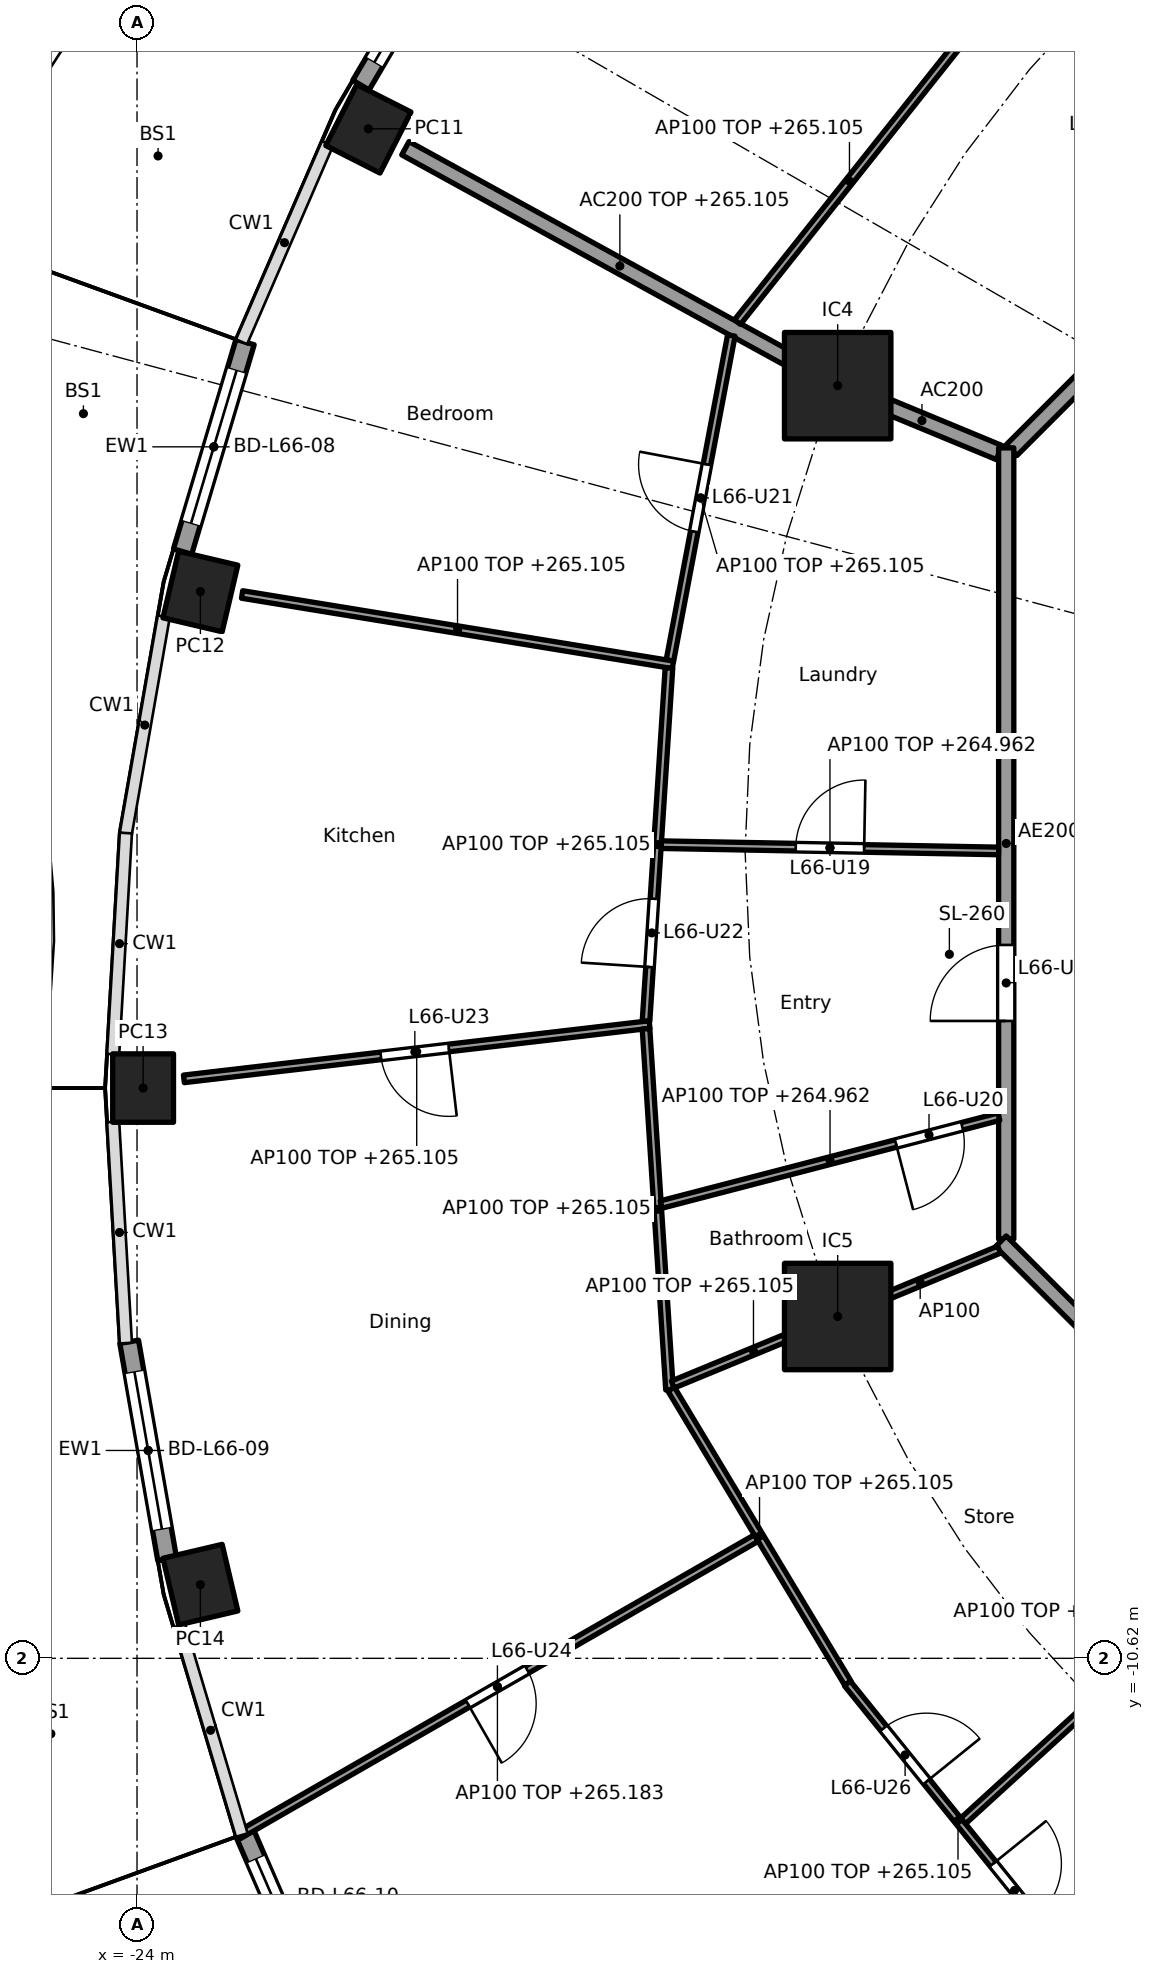
"""IFC4 building model, lengths in metres.
Left out: names, types, materials, properties, quantities, classifications, styles, units other than length and angle.
Written with IfcOpenShell. Run it as: python <this file> out.ifc"""

import sys

from ifc_helpers import new_model, si_unit, direction, frame, frame_2d, origin, origin_2d, place, context, subcontext, project, spatial, rectangle, hollow_rectangle, extrude, element, fill, save


model = new_model("IFC4")
c1 = context("Model", 3, precision=1e-05, world=origin(), true_north=direction((0.0, 1.0)))
c2 = subcontext(c1, "Body", "Model", "MODEL_VIEW")
j1 = project(units=[si_unit("LENGTHUNIT", "METRE"), si_unit("PLANEANGLEUNIT", "RADIAN")], contexts=[c1])
p1 = place(None, origin())
s1 = spatial("IfcSite", under=j1, at=p1, CompositionType="ELEMENT")
p2 = place(p1, origin())
s2 = spatial("IfcBuilding", under=s1, at=p2, CompositionType="ELEMENT")
p3 = place(p2, frame((0.0, 0.0, 262.2)))
s3 = spatial("IfcBuildingStorey", under=s2, at=p3, CompositionType="ELEMENT", Elevation=262.2)
for number, where, z_axis, x_axis in (
    (1, (-20.957, 9.502, 0.0), (0.0, 0.0, 1.0), (-0.452, -0.892, 0.0)),
    (2, (-23.166, 3.415, 0.0), (0.0, 0.0, 1.0), (-0.229, -0.973, 0.0)),
    (3, (-23.92, -3.118, 0.0), (0.0, 0.0, 1.0), (0.0, -1.0, 0.0)),
    (4, (-23.166, -9.65, 0.0), (0.0, 0.0, 1.0), (0.229, -0.973, 0.0)),
):
    element("IfcColumn", number, at=place(p3, frame(where, z_axis=z_axis, x_axis=x_axis)), inside=s3, PredefinedType="COLUMN", context=c2, shape_type="SweptSolid", body=[
        extrude(hollow_rectangle(XDim=0.9, YDim=0.8, WallThickness=0.028, at=origin_2d()), origin(), (0.0, 0.0, 1.0), 3.7),
    ])
for number, where, z_axis, x_axis in (
    (5, (-14.782, 6.123, 0.0), (0.0, 0.0, 1.0), (1.0, 0.0, 0.0)),
    (6, (-14.782, -6.123, 0.0), (0.0, 0.0, 1.0), (1.0, 0.0, 0.0)),
):
    element("IfcColumn", number, at=place(p3, frame(where, z_axis=z_axis, x_axis=x_axis)), inside=s3, PredefinedType="COLUMN", context=c2, shape_type="SweptSolid", body=[
        extrude(rectangle(XDim=1.4, YDim=1.4, at=origin_2d()), origin(), (0.0, 0.0, 1.0), 3.7),
    ])
p4 = place(p3, frame((-21.054, 10.077, 0.0), z_axis=(0.0, 0.0, 1.0), x_axis=(0.506371364425, 0.862315511452, 0.0)))
e7 = element("IfcWall", 7, at=p4, inside=s3, PredefinedType="SOLIDWALL", context=c2, shape_type="SweptSolid", body=[
    extrude(rectangle(XDim=2.796, YDim=0.25, at=frame_2d((1.398, 0.0))), origin(), (0.0, 0.0, 1.0), 3.44),
])
p5 = place(p4, frame((0.348, 0.0, 0.0)))
e8 = element("IfcOpeningElement", 8, at=p5, cuts=e7, PredefinedType="OPENING", context=c2, shape_type="SweptSolid", body=[
    extrude(rectangle(XDim=2.1, YDim=2.4, at=frame_2d((1.05, 1.2))), frame((0.0, 0.135, 0.0), z_axis=(0.0, -1.0, 0.0), x_axis=(1.0, 0.0, 0.0)), (0.0, 0.0, 1.0), 0.27),
])
p6 = place(p3, frame((-23.401, 3.94, 0.0), z_axis=(0.0, 0.0, 1.0), x_axis=(0.285876209024, 0.9582665564, 0.0)))
e9 = element("IfcWall", 9, at=p6, inside=s3, PredefinedType="SOLIDWALL", context=c2, shape_type="SweptSolid", body=[
    extrude(rectangle(XDim=2.877, YDim=0.25, at=frame_2d((1.438, 0.0))), origin(), (0.0, 0.0, 1.0), 3.44),
])
p7 = place(p6, frame((0.389, 0.0, 0.0)))
e10 = element("IfcOpeningElement", 10, at=p7, cuts=e9, PredefinedType="OPENING", context=c2, shape_type="SweptSolid", body=[
    extrude(rectangle(XDim=2.1, YDim=2.4, at=frame_2d((1.05, 1.2))), frame((0.0, 0.135, 0.0), z_axis=(0.0, -1.0, 0.0), x_axis=(1.0, 0.0, 0.0)), (0.0, 0.0, 1.0), 0.27),
])
p8 = place(p3, frame((-23.604, -9.315, 0.0), z_axis=(0.0, 0.0, 1.0), x_axis=(-0.172182411767, 0.985065082661, 0.0)))
e11 = element("IfcWall", 11, at=p8, inside=s3, PredefinedType="SOLIDWALL", context=c2, shape_type="SweptSolid", body=[
    extrude(rectangle(XDim=2.903, YDim=0.25, at=frame_2d((1.451, 0.0))), origin(), (0.0, 0.0, 1.0), 3.44),
])
p9 = place(p8, frame((0.401, 0.0, 0.0)))
e12 = element("IfcOpeningElement", 12, at=p9, cuts=e11, PredefinedType="OPENING", context=c2, shape_type="SweptSolid", body=[
    extrude(rectangle(XDim=2.1, YDim=2.4, at=frame_2d((1.05, 1.2))), frame((0.0, 0.135, 0.0), z_axis=(0.0, -1.0, 0.0), x_axis=(1.0, 0.0, 0.0)), (0.0, 0.0, 1.0), 0.27),
])
p10 = place(p3, frame((-21.454, -15.525, 0.0), z_axis=(0.0, 0.0, 1.0), x_axis=(-0.397597791596, 0.9175598052, 0.0)))
e13 = element("IfcWall", 13, at=p10, inside=s3, PredefinedType="SOLIDWALL", context=c2, shape_type="SweptSolid", body=[
    extrude(rectangle(XDim=2.841, YDim=0.25, at=frame_2d((1.42, 0.0))), origin(), (0.0, 0.0, 1.0), 3.44),
])
p11 = place(p10, frame((0.371, 0.0, 0.0)))
e14 = element("IfcOpeningElement", 14, at=p11, cuts=e13, PredefinedType="OPENING", context=c2, shape_type="SweptSolid", body=[
    extrude(rectangle(XDim=2.1, YDim=2.4, at=frame_2d((1.05, 1.2))), frame((0.0, 0.135, 0.0), z_axis=(0.0, -1.0, 0.0), x_axis=(1.0, 0.0, 0.0)), (0.0, 0.0, 1.0), 0.27),
])
p12 = place(p3, frame((-12.657, 5.243, 0.0), z_axis=(0.0, 0.0, 1.0), x_axis=(-0.923869415315, 0.382707856524, 0.0)))
e15 = element("IfcWall", 15, at=p12, inside=s3, PredefinedType="PARTITIONING", context=c2, shape_type="SweptSolid", body=[
    extrude(rectangle(XDim=2.2, YDim=0.2, at=frame_2d((1.1, 0.0))), origin(), (0.0, 0.0, 1.0), 3.44),
])
p13 = place(p3, frame((-14.826, 6.147, 0.0), z_axis=(0.0, 0.0, 1.0), x_axis=(-0.876484755865, 0.481429613481, 0.0)))
e16 = element("IfcWall", 16, at=p13, inside=s3, PredefinedType="PARTITIONING", context=c2, shape_type="SweptSolid", body=[
    extrude(rectangle(XDim=6.439, YDim=0.2, at=frame_2d((3.219, 0.0))), origin(), (0.0, 0.0, 1.0), 2.905),
])
p14 = place(p3, frame((-5.275, 12.494, 0.0), z_axis=(0.0, 0.0, 1.0), x_axis=(-0.707106781187, -0.707106781187, 0.0)))
e17 = element("IfcWall", 17, at=p14, inside=s3, PredefinedType="PARTITIONING", context=c2, shape_type="SweptSolid", body=[
    extrude(rectangle(XDim=10.209, YDim=0.2, at=frame_2d((5.104, 0.0))), origin(), (0.0, 0.0, 1.0), 3.44),
])
p15 = place(p3, frame((-12.565, 5.304, 0.0), z_axis=(0.0, 0.0, 1.0), x_axis=(0.0, -1.0, 0.0)))
e18 = element("IfcWall", 18, at=p15, inside=s3, PredefinedType="PARTITIONING", context=c2, shape_type="SweptSolid", body=[
    extrude(rectangle(XDim=10.409, YDim=0.2, at=frame_2d((5.205, 0.0))), origin(), (0.0, 0.0, 1.0), 3.44),
])
p16 = place(p15, frame((6.539, 0.0, 0.0)))
e19 = element("IfcOpeningElement", 19, at=p16, cuts=e18, PredefinedType="OPENING", context=c2, shape_type="SweptSolid", body=[
    extrude(rectangle(XDim=1.0, YDim=2.1, at=frame_2d((0.5, 1.05))), frame((0.0, 0.11, 0.0), z_axis=(0.0, -1.0, 0.0), x_axis=(1.0, 0.0, 0.0)), (0.0, 0.0, 1.0), 0.22),
])
p17 = place(p3, frame((-12.635, -5.134, 0.0), z_axis=(0.0, 0.0, 1.0), x_axis=(0.707106781187, -0.707106781187, 0.0)))
e20 = element("IfcWall", 20, at=p17, inside=s3, PredefinedType="PARTITIONING", context=c2, shape_type="SweptSolid", body=[
    extrude(rectangle(XDim=10.609, YDim=0.2, at=frame_2d((5.305, 0.0))), origin(), (0.0, 0.0, 1.0), 3.44),
])
p18 = place(p3, frame((-13.154, 10.667, 0.0), z_axis=(0.0, 0.0, 1.0), x_axis=(-0.622246555556, -0.782821323227, 0.0)))
e21 = element("IfcWall", 21, at=p18, inside=s3, PredefinedType="PARTITIONING", context=c2, shape_type="SweptSolid", body=[
    extrude(rectangle(XDim=4.736, YDim=0.1, at=frame_2d((2.368, 0.0))), origin(), (0.0, 0.0, 1.0), 2.905),
])
p19 = place(p3, frame((-16.181, 6.783, 0.0), z_axis=(0.0, 0.0, 1.0), x_axis=(-0.185670583745, -0.982612046706, 0.0)))
e22 = element("IfcWall", 22, at=p19, inside=s3, PredefinedType="PARTITIONING", context=c2, shape_type="SweptSolid", body=[
    extrude(rectangle(XDim=4.351, YDim=0.1, at=frame_2d((2.176, 0.0))), origin(), (0.0, 0.0, 1.0), 2.905),
])
p20 = place(p19, frame((1.726, 0.0, 0.0)))
e23 = element("IfcOpeningElement", 23, at=p20, cuts=e22, PredefinedType="OPENING", context=c2, shape_type="SweptSolid", body=[
    extrude(rectangle(XDim=0.9, YDim=2.1, at=frame_2d((0.45, 1.05))), frame((0.0, 0.06, 0.0), z_axis=(0.0, -1.0, 0.0), x_axis=(1.0, 0.0, 0.0)), (0.0, 0.0, 1.0), 0.12),
])
p21 = place(p3, frame((-16.949, 2.451, 0.0), z_axis=(0.0, 0.0, 1.0), x_axis=(-0.986937570833, 0.161103169673, 0.0)))
e24 = element("IfcWall", 24, at=p21, inside=s3, PredefinedType="PARTITIONING", context=c2, shape_type="SweptSolid", body=[
    extrude(rectangle(XDim=5.743, YDim=0.1, at=frame_2d((2.872, 0.0))), origin(), (0.0, 0.0, 1.0), 2.905),
])
p22 = place(p3, frame((-17.002, 2.409, 0.0), z_axis=(0.0, 0.0, 1.0), x_axis=(-0.064855550758, -0.997894662545, 0.0)))
e25 = element("IfcWall", 25, at=p22, inside=s3, PredefinedType="PARTITIONING", context=c2, shape_type="SweptSolid", body=[
    extrude(rectangle(XDim=4.656, YDim=0.1, at=frame_2d((2.328, 0.0))), origin(), (0.0, 0.0, 1.0), 2.905),
])
p23 = place(p22, frame((3.042, 0.0, 0.0)))
e26 = element("IfcOpeningElement", 26, at=p23, cuts=e25, PredefinedType="OPENING", context=c2, shape_type="SweptSolid", body=[
    extrude(rectangle(XDim=0.9, YDim=2.1, at=frame_2d((0.45, 1.05))), frame((0.0, 0.06, 0.0), z_axis=(0.0, -1.0, 0.0), x_axis=(1.0, 0.0, 0.0)), (0.0, 0.0, 1.0), 0.12),
])
p24 = place(p3, frame((-12.665, 0.002, 0.0), z_axis=(0.0, 0.0, 1.0), x_axis=(-0.999827178165, 0.018590691287, 0.0)))
e27 = element("IfcWall", 27, at=p24, inside=s3, PredefinedType="PARTITIONING", context=c2, shape_type="SweptSolid", body=[
    extrude(rectangle(XDim=4.439, YDim=0.1, at=frame_2d((2.219, 0.0))), origin(), (0.0, 0.0, 1.0), 2.762),
])
p25 = place(p24, frame((1.769, 0.0, 0.0)))
e28 = element("IfcOpeningElement", 28, at=p25, cuts=e27, PredefinedType="OPENING", context=c2, shape_type="SweptSolid", body=[
    extrude(rectangle(XDim=0.9, YDim=2.1, at=frame_2d((0.45, 1.05))), frame((0.0, 0.06, 0.0), z_axis=(0.0, -1.0, 0.0), x_axis=(1.0, 0.0, 0.0)), (0.0, 0.0, 1.0), 0.12),
])
p26 = place(p3, frame((-17.257, -2.282, 0.0), z_axis=(0.0, 0.0, 1.0), x_axis=(-0.993266024162, -0.11585596767, 0.0)))
e29 = element("IfcWall", 29, at=p26, inside=s3, PredefinedType="PARTITIONING", context=c2, shape_type="SweptSolid", body=[
    extrude(rectangle(XDim=6.168, YDim=0.1, at=frame_2d((3.084, 0.0))), origin(), (0.0, 0.0, 1.0), 2.905),
])
p27 = place(p26, frame((2.659, 0.0, 0.0)))
e30 = element("IfcOpeningElement", 30, at=p27, cuts=e29, PredefinedType="OPENING", context=c2, shape_type="SweptSolid", body=[
    extrude(rectangle(XDim=0.9, YDim=2.1, at=frame_2d((0.45, 1.05))), frame((0.0, 0.06, 0.0), z_axis=(0.0, -1.0, 0.0), x_axis=(1.0, 0.0, 0.0)), (0.0, 0.0, 1.0), 0.12),
])
p28 = place(p3, frame((-17.304, -2.338, 0.0), z_axis=(0.0, 0.0, 1.0), x_axis=(0.065003615989, -0.997885028402, 0.0)))
e31 = element("IfcWall", 31, at=p28, inside=s3, PredefinedType="PARTITIONING", context=c2, shape_type="SweptSolid", body=[
    extrude(rectangle(XDim=4.759, YDim=0.1, at=frame_2d((2.379, 0.0))), origin(), (0.0, 0.0, 1.0), 2.905),
])
p29 = place(p3, frame((-12.662, -3.495, 0.0), z_axis=(0.0, 0.0, 1.0), x_axis=(-0.967834941053, -0.251586022817, 0.0)))
e32 = element("IfcWall", 32, at=p29, inside=s3, PredefinedType="PARTITIONING", context=c2, shape_type="SweptSolid", body=[
    extrude(rectangle(XDim=4.59, YDim=0.1, at=frame_2d((2.295, 0.0))), origin(), (0.0, 0.0, 1.0), 2.762),
])
p30 = place(p29, frame((0.5, 0.0, 0.0)))
e33 = element("IfcOpeningElement", 33, at=p30, cuts=e32, PredefinedType="OPENING", context=c2, shape_type="SweptSolid", body=[
    extrude(rectangle(XDim=0.9, YDim=2.1, at=frame_2d((0.45, 1.05))), frame((0.0, 0.06, 0.0), z_axis=(0.0, -1.0, 0.0), x_axis=(1.0, 0.0, 0.0)), (0.0, 0.0, 1.0), 0.12),
])
p31 = place(p3, frame((-12.657, -5.243, 0.0), z_axis=(0.0, 0.0, 1.0), x_axis=(-0.923864733477, -0.382719158442, 0.0)))
e34 = element("IfcWall", 34, at=p31, inside=s3, PredefinedType="PARTITIONING", context=c2, shape_type="SweptSolid", body=[
    extrude(rectangle(XDim=2.25, YDim=0.1, at=frame_2d((1.125, 0.0))), origin(), (0.0, 0.0, 1.0), 3.44),
])
p32 = place(p3, frame((-14.828, -6.142, 0.0), z_axis=(0.0, 0.0, 1.0), x_axis=(-0.924479819749, -0.381230983627, 0.0)))
e35 = element("IfcWall", 35, at=p32, inside=s3, PredefinedType="PARTITIONING", context=c2, shape_type="SweptSolid", body=[
    extrude(rectangle(XDim=2.296, YDim=0.1, at=frame_2d((1.148, 0.0))), origin(), (0.0, 0.0, 1.0), 2.905),
])
p33 = place(p3, frame((-16.972, -7.08, 0.0), z_axis=(0.0, 0.0, 1.0), x_axis=(0.514989049311, -0.857196756346, 0.0)))
e36 = element("IfcWall", 36, at=p33, inside=s3, PredefinedType="PARTITIONING", context=c2, shape_type="SweptSolid", body=[
    extrude(rectangle(XDim=4.512, YDim=0.1, at=frame_2d((2.256, 0.0))), origin(), (0.0, 0.0, 1.0), 2.905),
])
p34 = place(p3, frame((-15.854, -9.038, 0.0), z_axis=(0.0, 0.0, 1.0), x_axis=(-0.867229230904, -0.497909089157, 0.0)))
e37 = element("IfcWall", 37, at=p34, inside=s3, PredefinedType="PARTITIONING", context=c2, shape_type="SweptSolid", body=[
    extrude(rectangle(XDim=7.853, YDim=0.1, at=frame_2d((3.926, 0.0))), origin(), (0.0, 0.0, 1.0), 2.983),
])
p35 = place(p34, frame((3.476, 0.0, 0.0)))
e38 = element("IfcOpeningElement", 38, at=p35, cuts=e37, PredefinedType="OPENING", context=c2, shape_type="SweptSolid", body=[
    extrude(rectangle(XDim=0.9, YDim=2.1, at=frame_2d((0.45, 1.05))), frame((0.0, 0.06, 0.0), z_axis=(0.0, -1.0, 0.0), x_axis=(1.0, 0.0, 0.0)), (0.0, 0.0, 1.0), 0.12),
])
p36 = place(p3, frame((-14.654, -10.951, 0.0), z_axis=(0.0, 0.0, 1.0), x_axis=(0.62815308134, -0.778089780426, 0.0)))
e39 = element("IfcWall", 39, at=p36, inside=s3, PredefinedType="PARTITIONING", context=c2, shape_type="SweptSolid", body=[
    extrude(rectangle(XDim=4.633, YDim=0.1, at=frame_2d((2.316, 0.0))), origin(), (0.0, 0.0, 1.0), 2.905),
])
p37 = place(p36, frame((0.758, 0.0, 0.0)))
e40 = element("IfcOpeningElement", 40, at=p37, cuts=e39, PredefinedType="OPENING", context=c2, shape_type="SweptSolid", body=[
    extrude(rectangle(XDim=0.9, YDim=2.1, at=frame_2d((0.45, 1.05))), frame((0.0, 0.06, 0.0), z_axis=(0.0, -1.0, 0.0), x_axis=(1.0, 0.0, 0.0)), (0.0, 0.0, 1.0), 0.12),
])
p38 = place(p36, frame((3.049, 0.0, 0.0)))
e41 = element("IfcOpeningElement", 41, at=p38, cuts=e39, PredefinedType="OPENING", context=c2, shape_type="SweptSolid", body=[
    extrude(rectangle(XDim=0.9, YDim=2.1, at=frame_2d((0.45, 1.05))), frame((0.0, 0.06, 0.0), z_axis=(0.0, -1.0, 0.0), x_axis=(1.0, 0.0, 0.0)), (0.0, 0.0, 1.0), 0.12),
])
p39 = place(p3, frame((-8.958, -8.952, 0.0), z_axis=(0.0, 0.0, 1.0), x_axis=(-0.73876526954, -0.673962815385, 0.0)))
e42 = element("IfcWall", 42, at=p39, inside=s3, PredefinedType="PARTITIONING", context=c2, shape_type="SweptSolid", body=[
    extrude(rectangle(XDim=5.647, YDim=0.1, at=frame_2d((2.824, 0.0))), origin(), (0.0, 0.0, 1.0), 2.762),
])
p40 = place(p5, origin())
e43 = element("IfcDoor", 43, at=p40, inside=s3, OperationType="SLIDING_TO_LEFT", PredefinedType="DOOR", context=c2, shape_type="SweptSolid", body=[
    extrude(rectangle(XDim=2.1, YDim=2.4, at=frame_2d((1.05, 1.2))), frame((0.0, 0.025, 0.0), z_axis=(0.0, -1.0, 0.0), x_axis=(1.0, 0.0, 0.0)), (0.0, 0.0, 1.0), 0.05),
])
fill(e8, e43)
p41 = place(p7, origin())
e44 = element("IfcDoor", 44, at=p41, inside=s3, OperationType="SLIDING_TO_LEFT", PredefinedType="DOOR", context=c2, shape_type="SweptSolid", body=[
    extrude(rectangle(XDim=2.1, YDim=2.4, at=frame_2d((1.05, 1.2))), frame((0.0, 0.025, 0.0), z_axis=(0.0, -1.0, 0.0), x_axis=(1.0, 0.0, 0.0)), (0.0, 0.0, 1.0), 0.05),
])
fill(e10, e44)
p42 = place(p9, origin())
e45 = element("IfcDoor", 45, at=p42, inside=s3, OperationType="SLIDING_TO_LEFT", PredefinedType="DOOR", context=c2, shape_type="SweptSolid", body=[
    extrude(rectangle(XDim=2.1, YDim=2.4, at=frame_2d((1.05, 1.2))), frame((0.0, 0.025, 0.0), z_axis=(0.0, -1.0, 0.0), x_axis=(1.0, 0.0, 0.0)), (0.0, 0.0, 1.0), 0.05),
])
fill(e12, e45)
p43 = place(p11, origin())
e46 = element("IfcDoor", 46, at=p43, inside=s3, OperationType="SLIDING_TO_LEFT", PredefinedType="DOOR", context=c2, shape_type="SweptSolid", body=[
    extrude(rectangle(XDim=2.1, YDim=2.4, at=frame_2d((1.05, 1.2))), frame((0.0, 0.025, 0.0), z_axis=(0.0, -1.0, 0.0), x_axis=(1.0, 0.0, 0.0)), (0.0, 0.0, 1.0), 0.05),
])
fill(e14, e46)
p44 = place(p16, frame((1.0, 0.0, 0.0), x_axis=(-1.0, 0.0, 0.0)))
e47 = element("IfcDoor", 47, at=p44, inside=s3, OperationType="SINGLE_SWING_LEFT", PredefinedType="DOOR", context=c2, shape_type="SweptSolid", body=[
    extrude(rectangle(XDim=1.0, YDim=2.1, at=frame_2d((0.5, 1.05))), frame((0.0, 0.025, 0.0), z_axis=(0.0, -1.0, 0.0), x_axis=(1.0, 0.0, 0.0)), (0.0, 0.0, 1.0), 0.05),
])
fill(e19, e47)
p45 = place(p25, frame((0.9, 0.0, 0.0), x_axis=(-1.0, 0.0, 0.0)))
e48 = element("IfcDoor", 48, at=p45, inside=s3, OperationType="SINGLE_SWING_RIGHT", PredefinedType="DOOR", context=c2, shape_type="SweptSolid", body=[
    extrude(rectangle(XDim=0.9, YDim=2.1, at=frame_2d((0.45, 1.05))), frame((0.0, 0.025, 0.0), z_axis=(0.0, -1.0, 0.0), x_axis=(1.0, 0.0, 0.0)), (0.0, 0.0, 1.0), 0.05),
])
fill(e28, e48)
p46 = place(p30, origin())
e49 = element("IfcDoor", 49, at=p46, inside=s3, OperationType="SINGLE_SWING_RIGHT", PredefinedType="DOOR", context=c2, shape_type="SweptSolid", body=[
    extrude(rectangle(XDim=0.9, YDim=2.1, at=frame_2d((0.45, 1.05))), frame((0.0, 0.025, 0.0), z_axis=(0.0, -1.0, 0.0), x_axis=(1.0, 0.0, 0.0)), (0.0, 0.0, 1.0), 0.05),
])
fill(e33, e49)
p47 = place(p20, frame((0.9, 0.0, 0.0), x_axis=(-1.0, 0.0, 0.0)))
e50 = element("IfcDoor", 50, at=p47, inside=s3, OperationType="SINGLE_SWING_RIGHT", PredefinedType="DOOR", context=c2, shape_type="SweptSolid", body=[
    extrude(rectangle(XDim=0.9, YDim=2.1, at=frame_2d((0.45, 1.05))), frame((0.0, 0.025, 0.0), z_axis=(0.0, -1.0, 0.0), x_axis=(1.0, 0.0, 0.0)), (0.0, 0.0, 1.0), 0.05),
])
fill(e23, e50)
p48 = place(p23, frame((0.9, 0.0, 0.0), x_axis=(-1.0, 0.0, 0.0)))
e51 = element("IfcDoor", 51, at=p48, inside=s3, OperationType="SINGLE_SWING_LEFT", PredefinedType="DOOR", context=c2, shape_type="SweptSolid", body=[
    extrude(rectangle(XDim=0.9, YDim=2.1, at=frame_2d((0.45, 1.05))), frame((0.0, 0.025, 0.0), z_axis=(0.0, -1.0, 0.0), x_axis=(1.0, 0.0, 0.0)), (0.0, 0.0, 1.0), 0.05),
])
fill(e26, e51)
p49 = place(p27, origin())
e52 = element("IfcDoor", 52, at=p49, inside=s3, OperationType="SINGLE_SWING_LEFT", PredefinedType="DOOR", context=c2, shape_type="SweptSolid", body=[
    extrude(rectangle(XDim=0.9, YDim=2.1, at=frame_2d((0.45, 1.05))), frame((0.0, 0.025, 0.0), z_axis=(0.0, -1.0, 0.0), x_axis=(1.0, 0.0, 0.0)), (0.0, 0.0, 1.0), 0.05),
])
fill(e30, e52)
p50 = place(p35, origin())
e53 = element("IfcDoor", 53, at=p50, inside=s3, OperationType="SINGLE_SWING_RIGHT", PredefinedType="DOOR", context=c2, shape_type="SweptSolid", body=[
    extrude(rectangle(XDim=0.9, YDim=2.1, at=frame_2d((0.45, 1.05))), frame((0.0, 0.025, 0.0), z_axis=(0.0, -1.0, 0.0), x_axis=(1.0, 0.0, 0.0)), (0.0, 0.0, 1.0), 0.05),
])
fill(e38, e53)
p51 = place(p37, origin())
e54 = element("IfcDoor", 54, at=p51, inside=s3, OperationType="SINGLE_SWING_RIGHT", PredefinedType="DOOR", context=c2, shape_type="SweptSolid", body=[
    extrude(rectangle(XDim=0.9, YDim=2.1, at=frame_2d((0.45, 1.05))), frame((0.0, 0.025, 0.0), z_axis=(0.0, -1.0, 0.0), x_axis=(1.0, 0.0, 0.0)), (0.0, 0.0, 1.0), 0.05),
])
fill(e40, e54)
p52 = place(p38, origin())
e55 = element("IfcDoor", 55, at=p52, inside=s3, OperationType="SINGLE_SWING_LEFT", PredefinedType="DOOR", context=c2, shape_type="SweptSolid", body=[
    extrude(rectangle(XDim=0.9, YDim=2.1, at=frame_2d((0.45, 1.05))), frame((0.0, 0.025, 0.0), z_axis=(0.0, -1.0, 0.0), x_axis=(1.0, 0.0, 0.0)), (0.0, 0.0, 1.0), 0.05),
])
fill(e41, e55)
save(model, sys.argv[1])
